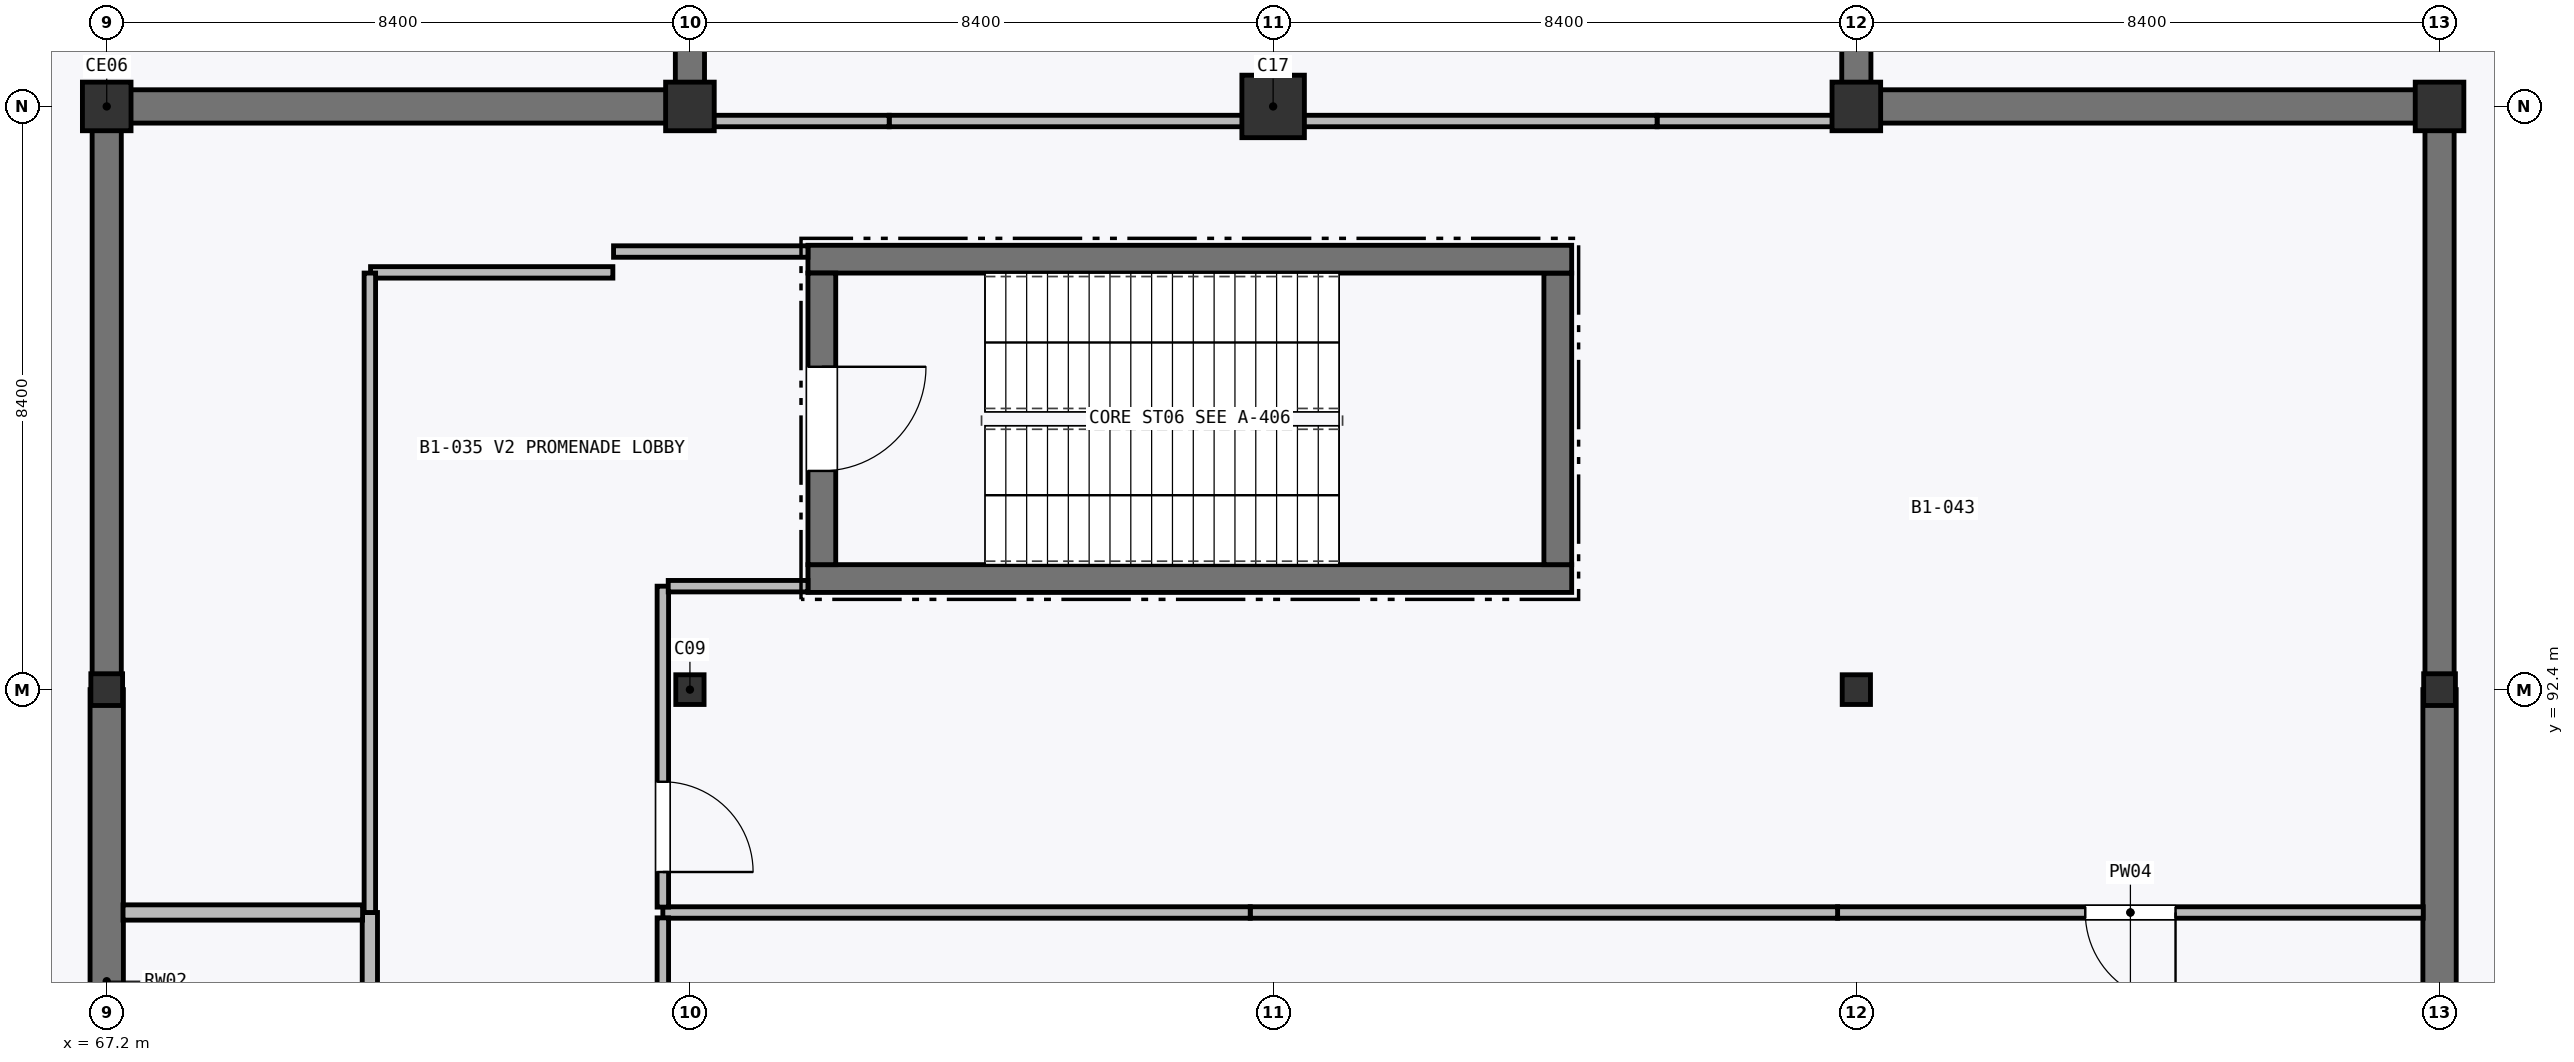
"""IFC4 building model, lengths in metres.
Left out: names, types, materials, properties, quantities, classifications, styles, units other than length and angle.
Written with IfcOpenShell. Run it as: python <this file> out.ifc"""

import sys

from ifc_helpers import new_model, si_unit, direction, frame, frame_2d, origin, origin_2d, place, context, subcontext, project, spatial, rectangle, hollow_circle, i_section, extrude, element, fill, save


model = new_model("IFC4")
c1 = context("Model", 3, precision=1e-05, world=origin(), true_north=direction((0.0, 1.0)))
c2 = subcontext(c1, "Body", "Model", "MODEL_VIEW")
j1 = project(units=[si_unit("LENGTHUNIT", "METRE"), si_unit("PLANEANGLEUNIT", "RADIAN")], contexts=[c1])
p1 = place(None, origin())
s1 = spatial("IfcSite", under=j1, at=p1, CompositionType="ELEMENT")
p2 = place(p1, origin())
s2 = spatial("IfcBuilding", under=s1, at=p2, CompositionType="ELEMENT")
p3 = place(p2, frame((0.0, 0.0, -5.4)))
s3 = spatial("IfcBuildingStorey", under=s2, at=p3, CompositionType="ELEMENT", Elevation=-5.4)
p4 = place(p3, frame((67.2, 92.4, 0.0), z_axis=(0.0, 0.0, 1.0), x_axis=(1.0, 0.0, 0.0)))
e1 = element("IfcColumn", 1, at=p4, inside=s3, PredefinedType="COLUMN", context=c2, shape_type="SweptSolid", body=[
    extrude(hollow_circle(Radius=0.229, WallThickness=0.016, at=origin_2d()), origin(), (0.0, 0.0, 1.0), 5.4),
])
p5 = place(p3, frame((67.2, 100.8, 0.0), z_axis=(0.0, 0.0, 1.0), x_axis=(1.0, 0.0, 0.0)))
e2 = element("IfcColumn", 2, at=p5, inside=s3, PredefinedType="COLUMN", context=c2, shape_type="SweptSolid", body=[
    extrude(rectangle(XDim=0.7, YDim=0.7, at=origin_2d()), origin(), (0.0, 0.0, 1.0), 5.4),
])
p6 = place(p3, frame((75.6, 92.4, 0.0), z_axis=(0.0, 0.0, 1.0), x_axis=(1.0, 0.0, 0.0)))
e3 = element("IfcColumn", 3, at=p6, inside=s3, PredefinedType="COLUMN", context=c2, shape_type="SweptSolid", body=[
    extrude(i_section(OverallWidth=0.407, OverallDepth=0.428, WebThickness=0.02, FlangeThickness=0.035, FilletRadius=0.022, at=origin_2d()), origin(), (0.0, 0.0, 1.0), 5.4),
])
p7 = place(p3, frame((75.6, 100.8, 0.0), z_axis=(0.0, 0.0, 1.0), x_axis=(1.0, 0.0, 0.0)))
e4 = element("IfcColumn", 4, at=p7, inside=s3, PredefinedType="COLUMN", context=c2, shape_type="SweptSolid", body=[
    extrude(rectangle(XDim=0.7, YDim=0.7, at=origin_2d()), origin(), (0.0, 0.0, 1.0), 5.4),
])
p8 = place(p3, frame((84.0, 100.8, 0.0), z_axis=(0.0, 0.0, 1.0), x_axis=(1.0, 0.0, 0.0)))
e5 = element("IfcColumn", 5, at=p8, inside=s3, PredefinedType="COLUMN", context=c2, shape_type="SweptSolid", body=[
    extrude(rectangle(XDim=0.9, YDim=0.9, at=origin_2d()), origin(), (0.0, 0.0, 1.0), 5.4),
])
p9 = place(p3, frame((92.4, 92.4, 0.0), z_axis=(0.0, 0.0, 1.0), x_axis=(1.0, 0.0, 0.0)))
e6 = element("IfcColumn", 6, at=p9, inside=s3, PredefinedType="COLUMN", context=c2, shape_type="SweptSolid", body=[
    extrude(i_section(OverallWidth=0.407, OverallDepth=0.428, WebThickness=0.02, FlangeThickness=0.035, FilletRadius=0.022, at=origin_2d()), origin(), (0.0, 0.0, 1.0), 5.4),
])
p10 = place(p3, frame((92.4, 100.8, 0.0), z_axis=(0.0, 0.0, 1.0), x_axis=(1.0, 0.0, 0.0)))
e7 = element("IfcColumn", 7, at=p10, inside=s3, PredefinedType="COLUMN", context=c2, shape_type="SweptSolid", body=[
    extrude(rectangle(XDim=0.7, YDim=0.7, at=origin_2d()), origin(), (0.0, 0.0, 1.0), 5.4),
])
p11 = place(p3, frame((100.8, 92.4, 0.0), z_axis=(0.0, 0.0, 1.0), x_axis=(1.0, 0.0, 0.0)))
e8 = element("IfcColumn", 8, at=p11, inside=s3, PredefinedType="COLUMN", context=c2, shape_type="SweptSolid", body=[
    extrude(hollow_circle(Radius=0.229, WallThickness=0.016, at=origin_2d()), origin(), (0.0, 0.0, 1.0), 5.4),
])
p12 = place(p3, frame((100.8, 100.8, 0.0), z_axis=(0.0, 0.0, 1.0), x_axis=(1.0, 0.0, 0.0)))
e9 = element("IfcColumn", 9, at=p12, inside=s3, PredefinedType="COLUMN", context=c2, shape_type="SweptSolid", body=[
    extrude(rectangle(XDim=0.7, YDim=0.7, at=origin_2d()), origin(), (0.0, 0.0, 1.0), 5.4),
])
p13 = place(p3, frame((67.2, 84.0, 0.0), z_axis=(0.0, 0.0, 1.0), x_axis=(0.0, 1.0, 0.0)))
e10 = element("IfcWall", 10, at=p13, inside=s3, PredefinedType="USERDEFINED", context=c2, shape_type="SweptSolid", body=[
    extrude(rectangle(XDim=8.4, YDim=0.48, at=frame_2d((4.2, 0.0))), origin(), (0.0, 0.0, 1.0), 5.13),
])
p14 = place(p3, frame((67.2, 92.4, 0.0), z_axis=(0.0, 0.0, 1.0), x_axis=(0.0, 1.0, 0.0)))
e11 = element("IfcWall", 11, at=p14, inside=s3, PredefinedType="USERDEFINED", context=c2, shape_type="SweptSolid", body=[
    extrude(rectangle(XDim=8.4, YDim=0.42, at=frame_2d((4.2, 0.0))), origin(), (0.0, 0.0, 1.0), 5.13),
])
p15 = place(p3, frame((67.2, 100.8, 0.0), z_axis=(0.0, 0.0, 1.0), x_axis=(1.0, 0.0, 0.0)))
e12 = element("IfcWall", 12, at=p15, inside=s3, PredefinedType="USERDEFINED", context=c2, shape_type="SweptSolid", body=[
    extrude(rectangle(XDim=8.4, YDim=0.48, at=frame_2d((4.2, 0.0))), origin(), (0.0, 0.0, 1.0), 5.13),
])
for number, where, z_axis, x_axis in (
    (13, (75.6, 100.8, 0.0), (0.0, 0.0, 1.0), (0.0, 1.0, 0.0)),
    (14, (92.4, 106.2, 0.0), (0.0, 0.0, 1.0), (0.0, -1.0, 0.0)),
):
    element("IfcWall", number, at=place(p3, frame(where, z_axis=z_axis, x_axis=x_axis)), inside=s3, PredefinedType="USERDEFINED", context=c2, shape_type="SweptSolid", body=[
        extrude(rectangle(XDim=5.4, YDim=0.42, at=frame_2d((2.7, 0.0))), origin(), (0.0, 0.0, 1.0), 5.13),
    ])
p16 = place(p3, frame((92.4, 100.8, 0.0), z_axis=(0.0, 0.0, 1.0), x_axis=(1.0, 0.0, 0.0)))
e15 = element("IfcWall", 15, at=p16, inside=s3, PredefinedType="USERDEFINED", context=c2, shape_type="SweptSolid", body=[
    extrude(rectangle(XDim=8.4, YDim=0.48, at=frame_2d((4.2, 0.0))), origin(), (0.0, 0.0, 1.0), 5.13),
])
p17 = place(p3, frame((100.8, 100.8, 0.0), z_axis=(0.0, 0.0, 1.0), x_axis=(0.0, -1.0, 0.0)))
e16 = element("IfcWall", 16, at=p17, inside=s3, PredefinedType="USERDEFINED", context=c2, shape_type="SweptSolid", body=[
    extrude(rectangle(XDim=8.4, YDim=0.42, at=frame_2d((4.2, 0.0))), origin(), (0.0, 0.0, 1.0), 5.13),
])
p18 = place(p3, frame((100.8, 92.4, 0.0), z_axis=(0.0, 0.0, 1.0), x_axis=(0.0, -1.0, 0.0)))
e17 = element("IfcWall", 17, at=p18, inside=s3, PredefinedType="USERDEFINED", context=c2, shape_type="SweptSolid", body=[
    extrude(rectangle(XDim=8.4, YDim=0.48, at=frame_2d((4.2, 0.0))), origin(), (0.0, 0.0, 1.0), 5.13),
])
p19 = place(p3, frame((77.3, 94.0, 0.0), z_axis=(0.0, 0.0, 1.0), x_axis=(1.0, 0.0, 0.0)))
e18 = element("IfcWall", 18, at=p19, inside=s3, PredefinedType="SHEAR", context=c2, shape_type="SweptSolid", body=[
    extrude(rectangle(XDim=11.0, YDim=0.4, at=frame_2d((5.5, 0.0))), origin(), (0.0, 0.0, 1.0), 5.145),
])
p20 = place(p3, frame((88.1, 94.2, 0.0), z_axis=(0.0, 0.0, 1.0), x_axis=(0.0, 1.0, 0.0)))
e19 = element("IfcWall", 19, at=p20, inside=s3, PredefinedType="SHEAR", context=c2, shape_type="SweptSolid", body=[
    extrude(rectangle(XDim=4.2, YDim=0.4, at=frame_2d((2.1, 0.0))), origin(), (0.0, 0.0, 1.0), 5.145),
])
p21 = place(p3, frame((88.3, 98.6, 0.0), z_axis=(0.0, 0.0, 1.0), x_axis=(-1.0, 0.0, 0.0)))
e20 = element("IfcWall", 20, at=p21, inside=s3, PredefinedType="SHEAR", context=c2, shape_type="SweptSolid", body=[
    extrude(rectangle(XDim=11.0, YDim=0.4, at=frame_2d((5.5, 0.0))), origin(), (0.0, 0.0, 1.0), 5.145),
])
p22 = place(p3, frame((77.5, 98.4, 0.0), z_axis=(0.0, 0.0, 1.0), x_axis=(0.0, -1.0, 0.0)))
e21 = element("IfcWall", 21, at=p22, inside=s3, PredefinedType="SHEAR", context=c2, shape_type="SweptSolid", body=[
    extrude(rectangle(XDim=4.2, YDim=0.4, at=frame_2d((2.1, 0.0))), origin(), (0.0, 0.0, 1.0), 5.145),
])
p23 = place(p22, frame((1.35, 0.0, 0.0)))
e22 = element("IfcOpeningElement", 22, at=p23, cuts=e21, PredefinedType="OPENING", context=c2, shape_type="SweptSolid", body=[
    extrude(rectangle(XDim=1.5, YDim=2.15, at=frame_2d((0.75, 1.075))), frame((0.0, 0.21, 0.0), z_axis=(0.0, -1.0, 0.0), x_axis=(1.0, 0.0, 0.0)), (0.0, 0.0, 1.0), 0.42),
])
p24 = place(p3, frame((70.99, 79.846, 0.0), z_axis=(0.0, 0.0, 1.0), x_axis=(0.0, 1.0, 0.0)))
e23 = element("IfcWall", 23, at=p24, inside=s3, PredefinedType="PARTITIONING", context=c2, shape_type="SweptSolid", body=[
    extrude(rectangle(XDim=9.344, YDim=0.22, at=frame_2d((4.672, 0.0))), origin(), (0.0, 0.0, 1.0), 5.145),
])
p25 = place(p24, frame((3.672, 0.0, 0.0)))
e24 = element("IfcOpeningElement", 24, at=p25, cuts=e23, PredefinedType="OPENING", context=c2, shape_type="SweptSolid", body=[
    extrude(rectangle(XDim=2.0, YDim=2.2, at=frame_2d((1.0, 1.1))), frame((0.0, 0.12, 0.0), z_axis=(0.0, -1.0, 0.0), x_axis=(1.0, 0.0, 0.0)), (0.0, 0.0, 1.0), 0.24),
])
p26 = place(p3, frame((70.885, 89.19, 0.0), z_axis=(0.0, 0.0, 1.0), x_axis=(-1.0, 0.0, 0.0)))
e25 = element("IfcWall", 25, at=p26, inside=s3, PredefinedType="PARTITIONING", context=c2, shape_type="SweptSolid", body=[
    extrude(rectangle(XDim=3.45, YDim=0.22, at=frame_2d((1.725, 0.0))), origin(), (0.0, 0.0, 1.0), 5.145),
])
p27 = place(p3, frame((100.565, 89.19, 0.0), z_axis=(0.0, 0.0, 1.0), x_axis=(-1.0, 0.0, 0.0)))
e26 = element("IfcWall", 26, at=p27, inside=s3, PredefinedType="PARTITIONING", context=c2, shape_type="SweptSolid", body=[
    extrude(rectangle(XDim=8.435, YDim=0.165, at=frame_2d((4.218, 0.0))), origin(), (0.0, 0.0, 1.0), 5.145),
])
p28 = place(p27, frame((3.567, 0.0, 0.0)))
e27 = element("IfcOpeningElement", 27, at=p28, cuts=e26, PredefinedType="OPENING", context=c2, shape_type="SweptSolid", body=[
    extrude(rectangle(XDim=1.3, YDim=2.2, at=frame_2d((0.65, 1.1))), frame((0.0, 0.093, 0.0), z_axis=(0.0, -1.0, 0.0), x_axis=(1.0, 0.0, 0.0)), (0.0, 0.0, 1.0), 0.185),
])
for number, where, z_axis, x_axis in (
    (28, (92.13, 89.19, 0.0), (0.0, 0.0, 1.0), (-1.0, 0.0, 0.0)),
    (29, (83.67, 89.19, 0.0), (0.0, 0.0, 1.0), (-1.0, 0.0, 0.0)),
):
    element("IfcWall", number, at=place(p3, frame(where, z_axis=z_axis, x_axis=x_axis)), inside=s3, PredefinedType="PARTITIONING", context=c2, shape_type="SweptSolid", body=[
        extrude(rectangle(XDim=8.46, YDim=0.165, at=frame_2d((4.23, 0.0))), origin(), (0.0, 0.0, 1.0), 5.145),
    ])
p29 = place(p3, frame((75.21, 89.113, 0.0), z_axis=(0.0, 0.0, 1.0), x_axis=(0.0, -1.0, 0.0)))
e30 = element("IfcWall", 30, at=p29, inside=s3, PredefinedType="PARTITIONING", context=c2, shape_type="SweptSolid", body=[
    extrude(rectangle(XDim=9.161, YDim=0.165, at=frame_2d((4.581, 0.0))), origin(), (0.0, 0.0, 1.0), 5.145),
])
p30 = place(p3, frame((75.21, 93.89, 0.0), z_axis=(0.0, 0.0, 1.0), x_axis=(0.0, -1.0, 0.0)))
e31 = element("IfcWall", 31, at=p30, inside=s3, PredefinedType="PARTITIONING", context=c2, shape_type="SweptSolid", body=[
    extrude(rectangle(XDim=4.622, YDim=0.165, at=frame_2d((2.311, 0.0))), origin(), (0.0, 0.0, 1.0), 5.145),
])
p31 = place(p30, frame((2.817, 0.0, 0.0)))
e32 = element("IfcOpeningElement", 32, at=p31, cuts=e31, PredefinedType="OPENING", context=c2, shape_type="SweptSolid", body=[
    extrude(rectangle(XDim=1.3, YDim=2.2, at=frame_2d((0.65, 1.1))), frame((0.0, 0.093, 0.0), z_axis=(0.0, -1.0, 0.0), x_axis=(1.0, 0.0, 0.0)), (0.0, 0.0, 1.0), 0.185),
])
p32 = place(p3, frame((71.0, 98.41, 0.0), z_axis=(0.0, 0.0, 1.0), x_axis=(1.0, 0.0, 0.0)))
e33 = element("IfcWall", 33, at=p32, inside=s3, PredefinedType="PARTITIONING", context=c2, shape_type="SweptSolid", body=[
    extrude(rectangle(XDim=3.49, YDim=0.165, at=frame_2d((1.745, 0.0))), origin(), (0.0, 0.0, 1.0), 5.145),
])
p33 = place(p3, frame((74.5, 98.71, 0.0), z_axis=(0.0, 0.0, 1.0), x_axis=(1.0, 0.0, 0.0)))
e34 = element("IfcWall", 34, at=p33, inside=s3, PredefinedType="PARTITIONING", context=c2, shape_type="SweptSolid", body=[
    extrude(rectangle(XDim=2.8, YDim=0.165, at=frame_2d((1.4, 0.0))), origin(), (0.0, 0.0, 1.0), 5.145),
])
p34 = place(p3, frame((77.3, 93.89, 0.0), z_axis=(0.0, 0.0, 1.0), x_axis=(-1.0, 0.0, 0.0)))
e35 = element("IfcWall", 35, at=p34, inside=s3, PredefinedType="PARTITIONING", context=c2, shape_type="SweptSolid", body=[
    extrude(rectangle(XDim=2.012, YDim=0.165, at=frame_2d((1.006, 0.0))), origin(), (0.0, 0.0, 1.0), 5.145),
])
p35 = place(p3, frame((70.99, 89.19, 0.0), z_axis=(0.0, 0.0, 1.0), x_axis=(0.0, 1.0, 0.0)))
e36 = element("IfcWall", 36, at=p35, inside=s3, PredefinedType="PARTITIONING", context=c2, shape_type="SweptSolid", body=[
    extrude(rectangle(XDim=9.21, YDim=0.165, at=frame_2d((4.605, 0.0))), origin(), (0.0, 0.0, 1.0), 5.145),
])
p36 = place(p3, frame((92.4, 100.59, 0.0), z_axis=(0.0, 0.0, 1.0), x_axis=(-1.0, 0.0, 0.0)))
e37 = element("IfcWall", 37, at=p36, inside=s3, PredefinedType="PARTITIONING", context=c2, shape_type="SweptSolid", body=[
    extrude(rectangle(XDim=2.87, YDim=0.165, at=frame_2d((1.435, 0.0))), origin(), (0.0, 0.0, 1.0), 4.672),
])
p37 = place(p3, frame((89.53, 100.59, 0.0), z_axis=(0.0, 0.0, 1.0), x_axis=(-1.0, 0.0, 0.0)))
e38 = element("IfcWall", 38, at=p37, inside=s3, PredefinedType="PARTITIONING", context=c2, shape_type="SweptSolid", body=[
    extrude(rectangle(XDim=11.06, YDim=0.165, at=frame_2d((5.53, 0.0))), origin(), (0.0, 0.0, 1.0), 4.414),
])
p38 = place(p3, frame((78.47, 100.59, 0.0), z_axis=(0.0, 0.0, 1.0), x_axis=(-1.0, 0.0, 0.0)))
e39 = element("IfcWall", 39, at=p38, inside=s3, PredefinedType="PARTITIONING", context=c2, shape_type="SweptSolid", body=[
    extrude(rectangle(XDim=2.87, YDim=0.165, at=frame_2d((1.435, 0.0))), origin(), (0.0, 0.0, 1.0), 4.414),
])
p39 = place(p23, origin())
e40 = element("IfcDoor", 40, at=p39, inside=s3, OperationType="SINGLE_SWING_LEFT", PredefinedType="DOOR", context=c2, shape_type="SweptSolid", body=[
    extrude(rectangle(XDim=1.5, YDim=2.15, at=frame_2d((0.75, 1.075))), frame((0.0, 0.025, 0.0), z_axis=(0.0, -1.0, 0.0), x_axis=(1.0, 0.0, 0.0)), (0.0, 0.0, 1.0), 0.05),
])
fill(e22, e40)
p40 = place(p28, origin())
e41 = element("IfcDoor", 41, at=p40, inside=s3, OperationType="SINGLE_SWING_LEFT", PredefinedType="DOOR", context=c2, shape_type="SweptSolid", body=[
    extrude(rectangle(XDim=1.3, YDim=2.2, at=frame_2d((0.65, 1.1))), frame((0.0, 0.025, 0.0), z_axis=(0.0, -1.0, 0.0), x_axis=(1.0, 0.0, 0.0)), (0.0, 0.0, 1.0), 0.05),
])
fill(e27, e41)
p41 = place(p31, origin())
e42 = element("IfcDoor", 42, at=p41, inside=s3, OperationType="SINGLE_SWING_RIGHT", PredefinedType="DOOR", context=c2, shape_type="SweptSolid", body=[
    extrude(rectangle(XDim=1.3, YDim=2.2, at=frame_2d((0.65, 1.1))), frame((0.0, 0.025, 0.0), z_axis=(0.0, -1.0, 0.0), x_axis=(1.0, 0.0, 0.0)), (0.0, 0.0, 1.0), 0.05),
])
fill(e32, e42)
save(model, sys.argv[1])
